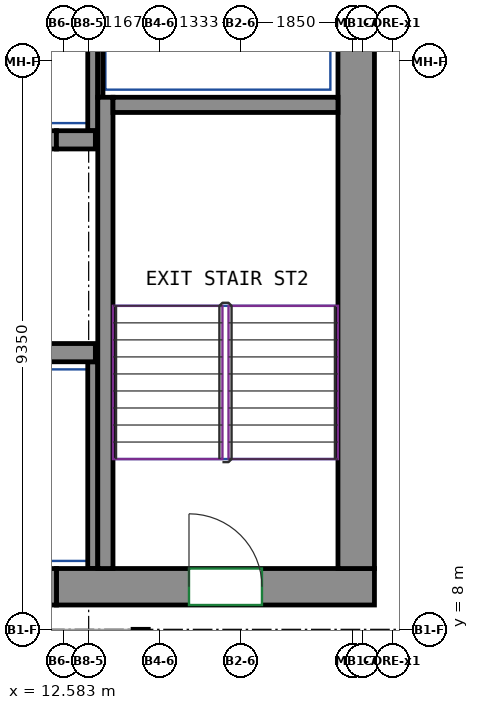
"""IFC4 building model, lengths in metres.
Left out: names, types, materials, properties, quantities, classifications, styles, units other than length and angle.
Written with IfcOpenShell. Run it as: python <this file> out.ifc"""

import sys

from ifc_helpers import new_model, si_unit, direction, frame, frame_2d, origin, place, context, subcontext, project, spatial, rectangle, extrude, source, transform, mapped, element, fill, save


model = new_model("IFC4")
c1 = context("Model", 3, precision=1e-05, world=origin(), true_north=direction((0.0, 1.0)))
c2 = subcontext(c1, "Body", "Model", "MODEL_VIEW")
j1 = project(units=[si_unit("LENGTHUNIT", "METRE"), si_unit("PLANEANGLEUNIT", "RADIAN")], contexts=[c1])
p1 = place(None, origin())
s1 = spatial("IfcSite", under=j1, at=p1, CompositionType="ELEMENT")
p2 = place(p1, origin())
s2 = spatial("IfcBuilding", under=s1, at=p2, CompositionType="ELEMENT")
p3 = place(p2, frame((0.0, 0.0, 315.4)))
s3 = spatial("IfcBuildingStorey", under=s2, at=p3, CompositionType="ELEMENT", Elevation=315.4)
m1 = source(origin(), c2, "Body", "SweptSolid", [
    extrude(rectangle(XDim=5.23, YDim=0.6, at=frame_2d((2.615, 0.0))), origin(), (0.0, 0.0, 1.0), 3.0),
])
p4 = place(p3, frame((12.47, 8.7, 0.0), z_axis=(0.0, 0.0, 1.0), x_axis=(1.0, 0.0, 0.0)))
e1 = element("IfcWall", 1, at=p4, inside=s3, PredefinedType="SHEAR", context=c2, shape_type="MappedRepresentation", body=[
    mapped(m1, transform((0.0, 0.0, 0.0))),
])
p5 = place(p4, frame((2.18, 0.0, 0.0)))
e2 = element("IfcOpeningElement", 2, at=p5, cuts=e1, PredefinedType="OPENING", context=c2, shape_type="SweptSolid", body=[
    extrude(rectangle(XDim=1.2, YDim=2.1, at=frame_2d((0.6, 1.05))), frame((0.0, 0.31, 0.0), z_axis=(0.0, -1.0, 0.0), x_axis=(1.0, 0.0, 0.0)), (0.0, 0.0, 1.0), 0.62),
])
m2 = source(origin(), c2, "Body", "SweptSolid", [
    extrude(rectangle(XDim=12.0, YDim=0.6, at=frame_2d((6.0, 0.0))), origin(), (0.0, 0.0, 1.0), 3.0),
])
p6 = place(p3, frame((17.4, 9.0, 0.0), z_axis=(0.0, 0.0, 1.0), x_axis=(0.0, 1.0, 0.0)))
e3 = element("IfcWall", 3, at=p6, inside=s3, PredefinedType="SHEAR", context=c2, shape_type="MappedRepresentation", body=[
    mapped(m2, transform((0.0, 0.0, 0.0))),
])
m3 = source(origin(), c2, "Body", "SweptSolid", [
    extrude(rectangle(XDim=7.75, YDim=0.25, at=frame_2d((3.875, 0.0))), origin(), (0.0, 0.0, 1.0), 3.0),
])
p7 = place(p3, frame((13.275, 9.0, 0.0), z_axis=(0.0, 0.0, 1.0), x_axis=(0.0, 1.0, 0.0)))
e4 = element("IfcWall", 4, at=p7, inside=s3, PredefinedType="SHEAR", context=c2, shape_type="MappedRepresentation", body=[
    mapped(m3, transform((0.0, 0.0, 0.0))),
])
m4 = source(origin(), c2, "Body", "SweptSolid", [
    extrude(rectangle(XDim=3.7, YDim=0.25, at=frame_2d((1.85, 0.0))), origin(), (0.0, 0.0, 1.0), 3.0),
])
p8 = place(p3, frame((13.4, 16.625, 0.0), z_axis=(0.0, 0.0, 1.0), x_axis=(1.0, 0.0, 0.0)))
e5 = element("IfcWall", 5, at=p8, inside=s3, PredefinedType="SHEAR", context=c2, shape_type="MappedRepresentation", body=[
    mapped(m4, transform((0.0, 0.0, 0.0))),
])
m5 = source(origin(), c2, "Body", "SweptSolid", [
    extrude(rectangle(XDim=2.82, YDim=0.3, at=frame_2d((1.41, 0.0))), origin(), (0.0, 0.0, 1.0), 3.0),
])
p9 = place(p3, frame((10.29, 12.55, 0.0), z_axis=(0.0, 0.0, 1.0), x_axis=(1.0, 0.0, 0.0)))
e6 = element("IfcWall", 6, at=p9, inside=s3, PredefinedType="SHEAR", context=c2, shape_type="MappedRepresentation", body=[
    mapped(m5, transform((0.0, 0.0, 0.0))),
])
m6 = source(origin(), c2, "Body", "SweptSolid", [
    extrude(rectangle(XDim=0.64, YDim=0.3, at=frame_2d((0.32, 0.0))), origin(), (0.0, 0.0, 1.0), 3.0),
])
p10 = place(p3, frame((12.47, 16.05, 0.0), z_axis=(0.0, 0.0, 1.0), x_axis=(1.0, 0.0, 0.0)))
e7 = element("IfcWall", 7, at=p10, inside=s3, PredefinedType="SHEAR", context=c2, shape_type="MappedRepresentation", body=[
    mapped(m6, transform((0.0, 0.0, 0.0))),
])
m7 = source(origin(), c2, "Body", "SweptSolid", [
    extrude(rectangle(XDim=1.4, YDim=0.3, at=frame_2d((0.7, 0.0))), origin(), (0.0, 0.0, 1.0), 2.4),
])
p11 = place(p3, frame((11.07, 16.05, 0.0), z_axis=(0.0, 0.0, 1.0), x_axis=(1.0, 0.0, 0.0)))
e8 = element("IfcWall", 8, at=p11, inside=s3, PredefinedType="PARTITIONING", context=c2, shape_type="MappedRepresentation", body=[
    mapped(m7, transform((0.0, 0.0, 0.0))),
])
p12 = place(p11, frame((0.15, 0.0, 0.0)))
e9 = element("IfcOpeningElement", 9, at=p12, cuts=e8, PredefinedType="OPENING", context=c2, shape_type="SweptSolid", body=[
    extrude(rectangle(XDim=1.1, YDim=2.1, at=frame_2d((0.55, 1.05))), frame((0.0, 0.16, 0.0), z_axis=(0.0, -1.0, 0.0), x_axis=(1.0, 0.0, 0.0)), (0.0, 0.0, 1.0), 0.32),
])
m8 = source(origin(), c2, "Body", "SweptSolid", [
    extrude(rectangle(XDim=3.275, YDim=0.165, at=frame_2d((1.638, 0.0))), origin(), (0.0, 0.0, 1.0), 3.0),
])
p13 = place(p3, frame((13.067, 16.2, 0.0), z_axis=(0.0, 0.0, 1.0), x_axis=(0.0, 1.0, 0.0)))
e10 = element("IfcWall", 10, at=p13, inside=s3, PredefinedType="PARTITIONING", context=c2, shape_type="MappedRepresentation", body=[
    mapped(m8, transform((0.0, 0.0, 0.0))),
])
m9 = source(origin(), c2, "Body", "SweptSolid", [
    extrude(rectangle(XDim=2.725, YDim=0.085, at=frame_2d((1.363, 0.0))), origin(), (0.0, 0.0, 1.0), 3.0),
])
p14 = place(p3, frame((13.192, 16.75, 0.0), z_axis=(0.0, 0.0, 1.0), x_axis=(0.0, 1.0, 0.0)))
e11 = element("IfcWall", 11, at=p14, inside=s3, PredefinedType="PARTITIONING", context=c2, shape_type="MappedRepresentation", body=[
    mapped(m9, transform((0.0, 0.0, 0.0))),
])
m10 = source(origin(), c2, "Body", "SweptSolid", [
    extrude(rectangle(XDim=3.4, YDim=0.165, at=frame_2d((1.7, 0.0))), origin(), (0.0, 0.0, 1.0), 3.0),
])
p15 = place(p3, frame((13.067, 9.0, 0.0), z_axis=(0.0, 0.0, 1.0), x_axis=(0.0, 1.0, 0.0)))
e12 = element("IfcWall", 12, at=p15, inside=s3, PredefinedType="PARTITIONING", context=c2, shape_type="MappedRepresentation", body=[
    mapped(m10, transform((0.0, 0.0, 0.0))),
])
m11 = source(origin(), c2, "Body", "SweptSolid", [
    extrude(rectangle(XDim=1.4, YDim=0.6, at=frame_2d((0.7, 0.0))), origin(), (0.0, 0.0, 1.0), 2.7),
])
p16 = place(p3, frame((11.07, 8.7, 0.0), z_axis=(0.0, 0.0, 1.0), x_axis=(1.0, 0.0, 0.0)))
e13 = element("IfcWall", 13, at=p16, inside=s3, PredefinedType="PARTITIONING", context=c2, shape_type="MappedRepresentation", body=[
    mapped(m11, transform((0.0, 0.0, 0.0))),
])
p17 = place(p16, frame((0.25, 0.0, 0.0)))
e14 = element("IfcOpeningElement", 14, at=p17, cuts=e13, PredefinedType="OPENING", context=c2, shape_type="SweptSolid", body=[
    extrude(rectangle(XDim=0.9, YDim=2.1, at=frame_2d((0.45, 1.05))), frame((0.0, 0.31, 0.0), z_axis=(0.0, -1.0, 0.0), x_axis=(1.0, 0.0, 0.0)), (0.0, 0.0, 1.0), 0.62),
])
p18 = place(p5, origin())
e15 = element("IfcDoor", 15, at=p18, inside=s3, OperationType="DOUBLE_DOOR_SINGLE_SWING", PredefinedType="DOOR", context=c2, shape_type="SweptSolid", body=[
    extrude(rectangle(XDim=1.2, YDim=2.1, at=frame_2d((0.6, 1.05))), frame((0.0, 0.205, 0.0), z_axis=(0.0, -1.0, 0.0), x_axis=(1.0, 0.0, 0.0)), (0.0, 0.0, 1.0), 0.05),
])
fill(e2, e15)
save(model, sys.argv[1])
